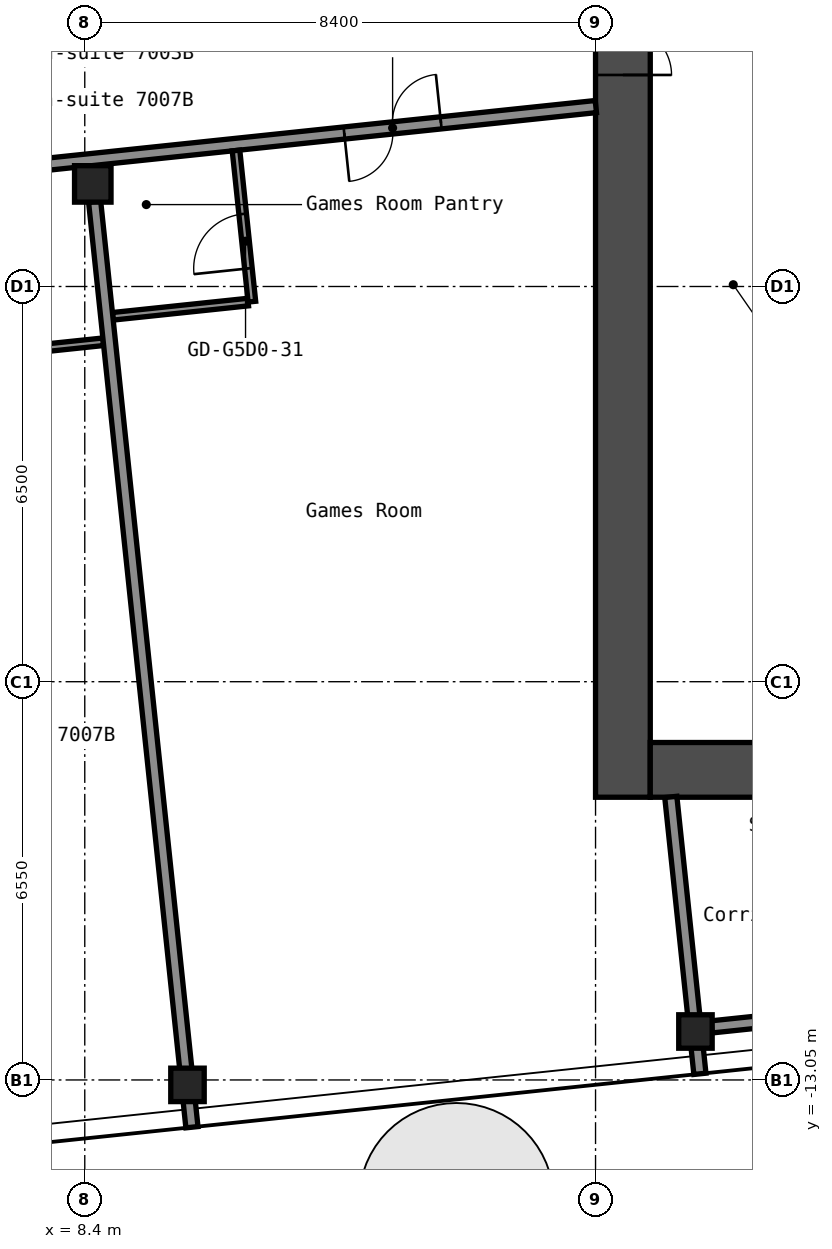
"""IFC4 building model, lengths in metres.
Left out: names, types, materials, properties, quantities, classifications, styles, units other than length and angle.
Written with IfcOpenShell. Run it as: python <this file> out.ifc"""

import sys

from ifc_helpers import new_model, si_unit, direction, frame, frame_2d, origin, origin_2d, place, context, subcontext, project, spatial, rectangle, hollow_rectangle, extrude, element, fill, save


model = new_model("IFC4")
c1 = context("Model", 3, precision=1e-05, world=origin(), true_north=direction((0.0, 1.0)))
c2 = subcontext(c1, "Body", "Model", "MODEL_VIEW")
j1 = project(units=[si_unit("LENGTHUNIT", "METRE"), si_unit("PLANEANGLEUNIT", "RADIAN")], contexts=[c1])
p1 = place(None, origin())
s1 = spatial("IfcSite", under=j1, at=p1, CompositionType="ELEMENT")
p2 = place(p1, origin())
s2 = spatial("IfcBuilding", under=s1, at=p2, CompositionType="ELEMENT")
p3 = place(p2, frame((0.0, 0.0, 248.6)))
s3 = spatial("IfcBuildingStorey", under=s2, at=p3, CompositionType="ELEMENT", Elevation=248.6)
p4 = place(p3, frame((10.089, -13.131, 0.0), z_axis=(0.0, 0.0, 1.0), x_axis=(1.0, 0.0, 0.0)))
e1 = element("IfcColumn", 1, at=p4, inside=s3, PredefinedType="COLUMN", context=c2, shape_type="SweptSolid", body=[
    extrude(hollow_rectangle(XDim=0.55, YDim=0.55, WallThickness=0.022, InnerFilletRadius=0.033, OuterFilletRadius=0.055, at=origin_2d()), origin(), (0.0, 0.0, 1.0), 2.75),
])
p5 = place(p3, frame((8.532, 1.688, 0.0), z_axis=(0.0, 0.0, 1.0), x_axis=(1.0, 0.0, 0.0)))
e2 = element("IfcColumn", 2, at=p5, inside=s3, PredefinedType="COLUMN", context=c2, shape_type="SweptSolid", body=[
    extrude(hollow_rectangle(XDim=0.6, YDim=0.6, WallThickness=0.025, InnerFilletRadius=0.038, OuterFilletRadius=0.062, at=origin_2d()), origin(), (0.0, 0.0, 1.0), 2.75),
])
p6 = place(p3, frame((18.443, -12.253, 0.0), z_axis=(0.0, 0.0, 1.0), x_axis=(1.0, 0.0, 0.0)))
e3 = element("IfcColumn", 3, at=p6, inside=s3, PredefinedType="COLUMN", context=c2, shape_type="SweptSolid", body=[
    extrude(hollow_rectangle(XDim=0.55, YDim=0.55, WallThickness=0.022, InnerFilletRadius=0.033, OuterFilletRadius=0.055, at=origin_2d()), origin(), (0.0, 0.0, 1.0), 2.75),
])
p7 = place(p3, frame((17.25, -8.4, 0.0), z_axis=(0.0, 0.0, 1.0), x_axis=(0.0, 1.0, 0.0)))
e4 = element("IfcWall", 4, at=p7, inside=s3, PredefinedType="SHEAR", context=c2, shape_type="SweptSolid", body=[
    extrude(rectangle(XDim=16.8, YDim=0.9, at=frame_2d((8.4, 0.0))), origin(), (0.0, 0.0, 1.0), 2.75),
])
p8 = place(p7, frame((11.879, 0.0, 0.0)))
e5 = element("IfcOpeningElement", 5, at=p8, cuts=e4, PredefinedType="OPENING", context=c2, shape_type="SweptSolid", body=[
    extrude(rectangle(XDim=1.6, YDim=2.1, at=frame_2d((0.8, 1.05))), frame((0.0, 0.46, 0.0), z_axis=(0.0, -1.0, 0.0), x_axis=(1.0, 0.0, 0.0)), (0.0, 0.0, 1.0), 0.92),
])
p9 = place(p3, frame((17.7, -7.95, 0.0), z_axis=(0.0, 0.0, 1.0), x_axis=(1.0, 0.0, 0.0)))
e6 = element("IfcWall", 6, at=p9, inside=s3, PredefinedType="SHEAR", context=c2, shape_type="SweptSolid", body=[
    extrude(rectangle(XDim=15.0, YDim=0.9, at=frame_2d((7.5, 0.0))), origin(), (0.0, 0.0, 1.0), 2.75),
])
p10 = place(p9, frame((2.55, 0.0, 0.0)))
e7 = element("IfcOpeningElement", 7, at=p10, cuts=e6, PredefinedType="OPENING", context=c2, shape_type="SweptSolid", body=[
    extrude(rectangle(XDim=1.0, YDim=2.1, at=frame_2d((0.5, 1.05))), frame((0.0, 0.46, 0.0), z_axis=(0.0, -1.0, 0.0), x_axis=(1.0, 0.0, 0.0)), (0.0, 0.0, 1.0), 0.92),
])
p11 = place(p3, frame((18.708, -12.177, 0.0), z_axis=(0.0, 0.0, 1.0), x_axis=(0.994521604238, 0.104531233147, 0.0)))
e8 = element("IfcWall", 8, at=p11, inside=s3, PredefinedType="PARTITIONING", context=c2, shape_type="SweptSolid", body=[
    extrude(rectangle(XDim=19.698, YDim=0.2, at=frame_2d((9.849, 0.0))), origin(), (0.0, 0.0, 1.0), 2.75),
])
p12 = place(p3, frame((6.379, -1.153, 0.0), z_axis=(0.0, 0.0, 1.0), x_axis=(0.994530605544, 0.104445558238, 0.0)))
e9 = element("IfcWall", 9, at=p12, inside=s3, PredefinedType="PARTITIONING", context=c2, shape_type="SweptSolid", body=[
    extrude(rectangle(XDim=2.337, YDim=0.125, at=frame_2d((1.169, 0.0))), origin(), (0.0, 0.0, 1.0), 2.75),
])
p13 = place(p3, frame((8.861, -0.49, 0.0), z_axis=(0.0, 0.0, 1.0), x_axis=(0.99452218011, 0.104525754092, 0.0)))
e10 = element("IfcWall", 10, at=p13, inside=s3, PredefinedType="PARTITIONING", context=c2, shape_type="SweptSolid", body=[
    extrude(rectangle(XDim=2.238, YDim=0.125, at=frame_2d((1.119, 0.0))), origin(), (0.0, 0.0, 1.0), 2.75),
])
p14 = place(p3, frame((-16.572, -0.549, 0.0), z_axis=(0.0, 0.0, 1.0), x_axis=(0.994521146831, 0.104535584879, 0.0)))
e11 = element("IfcWall", 11, at=p14, inside=s3, PredefinedType="PARTITIONING", context=c2, shape_type="SweptSolid", body=[
    extrude(rectangle(XDim=33.561, YDim=0.2, at=frame_2d((16.78, 0.0))), origin(), (0.0, 0.0, 1.0), 2.75),
])
p15 = place(p14, frame((4.2, 0.0, 0.0)))
e12 = element("IfcOpeningElement", 12, at=p15, cuts=e11, PredefinedType="OPENING", context=c2, shape_type="SweptSolid", body=[
    extrude(rectangle(XDim=1.6, YDim=2.1, at=frame_2d((0.8, 1.05))), frame((0.0, 0.11, 0.0), z_axis=(0.0, -1.0, 0.0), x_axis=(1.0, 0.0, 0.0)), (0.0, 0.0, 1.0), 0.22),
])
p16 = place(p14, frame((10.64, 0.0, 0.0)))
e13 = element("IfcOpeningElement", 13, at=p16, cuts=e11, PredefinedType="OPENING", context=c2, shape_type="SweptSolid", body=[
    extrude(rectangle(XDim=0.9, YDim=2.1, at=frame_2d((0.45, 1.05))), frame((0.0, 0.11, 0.0), z_axis=(0.0, -1.0, 0.0), x_axis=(1.0, 0.0, 0.0)), (0.0, 0.0, 1.0), 0.22),
])
p17 = place(p14, frame((14.84, 0.0, 0.0)))
e14 = element("IfcOpeningElement", 14, at=p17, cuts=e11, PredefinedType="OPENING", context=c2, shape_type="SweptSolid", body=[
    extrude(rectangle(XDim=0.9, YDim=2.1, at=frame_2d((0.45, 1.05))), frame((0.0, 0.11, 0.0), z_axis=(0.0, -1.0, 0.0), x_axis=(1.0, 0.0, 0.0)), (0.0, 0.0, 1.0), 0.22),
])
p18 = place(p14, frame((19.65, 0.0, 0.0)))
e15 = element("IfcOpeningElement", 15, at=p18, cuts=e11, PredefinedType="OPENING", context=c2, shape_type="SweptSolid", body=[
    extrude(rectangle(XDim=1.0, YDim=2.1, at=frame_2d((0.5, 1.05))), frame((0.0, 0.11, 0.0), z_axis=(0.0, -1.0, 0.0), x_axis=(1.0, 0.0, 0.0)), (0.0, 0.0, 1.0), 0.22),
])
p19 = place(p14, frame((21.35, 0.0, 0.0)))
e16 = element("IfcOpeningElement", 16, at=p19, cuts=e11, PredefinedType="OPENING", context=c2, shape_type="SweptSolid", body=[
    extrude(rectangle(XDim=1.0, YDim=2.1, at=frame_2d((0.5, 1.05))), frame((0.0, 0.11, 0.0), z_axis=(0.0, -1.0, 0.0), x_axis=(1.0, 0.0, 0.0)), (0.0, 0.0, 1.0), 0.22),
])
p20 = place(p14, frame((29.4, 0.0, 0.0)))
e17 = element("IfcOpeningElement", 17, at=p20, cuts=e11, PredefinedType="OPENING", context=c2, shape_type="SweptSolid", body=[
    extrude(rectangle(XDim=1.6, YDim=2.1, at=frame_2d((0.8, 1.05))), frame((0.0, 0.11, 0.0), z_axis=(0.0, -1.0, 0.0), x_axis=(1.0, 0.0, 0.0)), (0.0, 0.0, 1.0), 0.22),
])
p21 = place(p3, frame((-16.805, 2.041, 0.0), z_axis=(0.0, 0.0, 1.0), x_axis=(0.994521146831, 0.104535584879, 0.0)))
e18 = element("IfcWall", 18, at=p21, inside=s3, PredefinedType="PARTITIONING", context=c2, shape_type="SweptSolid", body=[
    extrude(rectangle(XDim=33.561, YDim=0.2, at=frame_2d((16.78, 0.0))), origin(), (0.0, 0.0, 1.0), 2.75),
])
p22 = place(p21, frame((3.661, 0.0, 0.0)))
e19 = element("IfcOpeningElement", 19, at=p22, cuts=e18, PredefinedType="OPENING", context=c2, shape_type="SweptSolid", body=[
    extrude(rectangle(XDim=1.0, YDim=2.1, at=frame_2d((0.5, 1.05))), frame((0.0, 0.11, 0.0), z_axis=(0.0, -1.0, 0.0), x_axis=(1.0, 0.0, 0.0)), (0.0, 0.0, 1.0), 0.22),
])
p23 = place(p21, frame((13.761, 0.0, 0.0)))
e20 = element("IfcOpeningElement", 20, at=p23, cuts=e18, PredefinedType="OPENING", context=c2, shape_type="SweptSolid", body=[
    extrude(rectangle(XDim=1.0, YDim=2.1, at=frame_2d((0.5, 1.05))), frame((0.0, 0.11, 0.0), z_axis=(0.0, -1.0, 0.0), x_axis=(1.0, 0.0, 0.0)), (0.0, 0.0, 1.0), 0.22),
])
p24 = place(p21, frame((19.611, 0.0, 0.0)))
e21 = element("IfcOpeningElement", 21, at=p24, cuts=e18, PredefinedType="OPENING", context=c2, shape_type="SweptSolid", body=[
    extrude(rectangle(XDim=1.0, YDim=2.1, at=frame_2d((0.5, 1.05))), frame((0.0, 0.11, 0.0), z_axis=(0.0, -1.0, 0.0), x_axis=(1.0, 0.0, 0.0)), (0.0, 0.0, 1.0), 0.22),
])
p25 = place(p21, frame((21.311, 0.0, 0.0)))
e22 = element("IfcOpeningElement", 22, at=p25, cuts=e18, PredefinedType="OPENING", context=c2, shape_type="SweptSolid", body=[
    extrude(rectangle(XDim=1.0, YDim=2.1, at=frame_2d((0.5, 1.05))), frame((0.0, 0.11, 0.0), z_axis=(0.0, -1.0, 0.0), x_axis=(1.0, 0.0, 0.0)), (0.0, 0.0, 1.0), 0.22),
])
p26 = place(p21, frame((28.861, 0.0, 0.0)))
e23 = element("IfcOpeningElement", 23, at=p26, cuts=e18, PredefinedType="OPENING", context=c2, shape_type="SweptSolid", body=[
    extrude(rectangle(XDim=1.0, YDim=2.1, at=frame_2d((0.5, 1.05))), frame((0.0, 0.11, 0.0), z_axis=(0.0, -1.0, 0.0), x_axis=(1.0, 0.0, 0.0)), (0.0, 0.0, 1.0), 0.22),
])
p27 = place(p3, frame((10.162, -13.827, 0.0), z_axis=(0.0, 0.0, 1.0), x_axis=(-0.104523729364, 0.99452239291, 0.0)))
e24 = element("IfcWall", 24, at=p27, inside=s3, PredefinedType="PARTITIONING", context=c2, shape_type="SweptSolid", body=[
    extrude(rectangle(XDim=15.308, YDim=0.2, at=frame_2d((7.654, 0.0))), origin(), (0.0, 0.0, 1.0), 2.75),
])
p28 = place(p3, frame((11.148, -0.25, 0.0), z_axis=(0.0, 0.0, 1.0), x_axis=(-0.104491611519, 0.994525767953, 0.0)))
e25 = element("IfcWall", 25, at=p28, inside=s3, PredefinedType="PARTITIONING", context=c2, shape_type="SweptSolid", body=[
    extrude(rectangle(XDim=2.5, YDim=0.125, at=frame_2d((1.25, 0.0))), origin(), (0.0, 0.0, 1.0), 2.75),
])
p29 = place(p28, frame((0.55, 0.0, 0.0)))
e26 = element("IfcOpeningElement", 26, at=p29, cuts=e25, PredefinedType="OPENING", context=c2, shape_type="SweptSolid", body=[
    extrude(rectangle(XDim=0.9, YDim=2.1, at=frame_2d((0.45, 1.05))), frame((0.0, 0.073, 0.0), z_axis=(0.0, -1.0, 0.0), x_axis=(1.0, 0.0, 0.0)), (0.0, 0.0, 1.0), 0.145),
])
p30 = place(p3, frame((18.516, -12.949, 0.0), z_axis=(0.0, 0.0, 1.0), x_axis=(-0.104548796268, 0.994519758074, 0.0)))
e27 = element("IfcWall", 27, at=p30, inside=s3, PredefinedType="PARTITIONING", context=c2, shape_type="SweptSolid", body=[
    extrude(rectangle(XDim=4.579, YDim=0.2, at=frame_2d((2.29, 0.0))), origin(), (0.0, 0.0, 1.0), 2.75),
])
p31 = place(p8, origin())
e28 = element("IfcDoor", 28, at=p31, inside=s3, OperationType="DOUBLE_DOOR_SINGLE_SWING", PredefinedType="DOOR", context=c2, shape_type="SweptSolid", body=[
    extrude(rectangle(XDim=1.6, YDim=2.1, at=frame_2d((0.8, 1.05))), frame((0.0, 0.025, 0.0), z_axis=(0.0, -1.0, 0.0), x_axis=(1.0, 0.0, 0.0)), (0.0, 0.0, 1.0), 0.05),
])
fill(e5, e28)
p32 = place(p20, origin())
e29 = element("IfcDoor", 29, at=p32, inside=s3, OperationType="DOUBLE_DOOR_SINGLE_SWING", PredefinedType="DOOR", context=c2, shape_type="SweptSolid", body=[
    extrude(rectangle(XDim=1.6, YDim=2.1, at=frame_2d((0.8, 1.05))), frame((0.0, 0.025, 0.0), z_axis=(0.0, -1.0, 0.0), x_axis=(1.0, 0.0, 0.0)), (0.0, 0.0, 1.0), 0.05),
])
fill(e17, e29)
p33 = place(p29, origin())
e30 = element("IfcDoor", 30, at=p33, inside=s3, OperationType="SINGLE_SWING_RIGHT", PredefinedType="DOOR", context=c2, shape_type="SweptSolid", body=[
    extrude(rectangle(XDim=0.9, YDim=2.1, at=frame_2d((0.45, 1.05))), frame((0.0, 0.025, 0.0), z_axis=(0.0, -1.0, 0.0), x_axis=(1.0, 0.0, 0.0)), (0.0, 0.0, 1.0), 0.05),
])
fill(e26, e30)
save(model, sys.argv[1])
